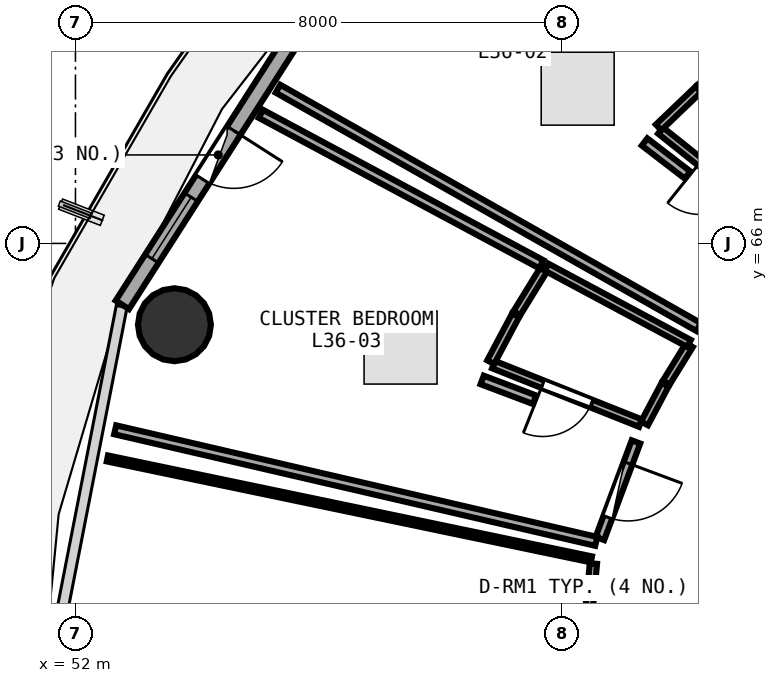
"""IFC4 building model, lengths in metres.
Left out: names, types, materials, properties, quantities, classifications, styles, units other than length and angle.
Written with IfcOpenShell. Run it as: python <this file> out.ifc"""

import sys

from ifc_helpers import new_model, si_unit, direction, frame, frame_2d, origin, origin_2d, place, context, subcontext, project, spatial, rectangle, circle, extrude, element, fill, save


model = new_model("IFC4")
c1 = context("Model", 3, precision=1e-05, world=origin(), true_north=direction((0.0, 1.0)))
c2 = subcontext(c1, "Body", "Model", "MODEL_VIEW")
j1 = project(units=[si_unit("LENGTHUNIT", "METRE"), si_unit("PLANEANGLEUNIT", "RADIAN")], contexts=[c1])
p1 = place(None, origin())
s1 = spatial("IfcSite", under=j1, at=p1, CompositionType="ELEMENT")
p2 = place(p1, origin())
s2 = spatial("IfcBuilding", under=s1, at=p2, CompositionType="ELEMENT")
p3 = place(p2, frame((0.0, 0.0, 143.1)))
s3 = spatial("IfcBuildingStorey", under=s2, at=p3, CompositionType="ELEMENT", Elevation=143.1)
p4 = place(p3, frame((53.627, 64.663, 0.0), z_axis=(0.0, 0.0, 1.0), x_axis=(1.0, 0.0, 0.0)))
e1 = element("IfcColumn", 1, at=p4, inside=s3, PredefinedType="COLUMN", context=c2, shape_type="SweptSolid", body=[
    extrude(circle(Radius=0.6, at=origin_2d()), origin(), (0.0, 0.0, 1.0), 3.75),
])
p5 = place(p3, frame((56.679, 71.1, 0.0), z_axis=(0.0, 0.0, 1.0), x_axis=(-0.538801521808, -0.842432739213, 0.0)))
e2 = element("IfcWall", 2, at=p5, inside=s3, PredefinedType="SOLIDWALL", context=c2, shape_type="SweptSolid", body=[
    extrude(rectangle(XDim=7.253, YDim=0.26, at=frame_2d((3.627, 0.0))), origin(), (0.0, 0.0, 1.0), 3.475),
])
p6 = place(p5, frame((3.852, 0.0, 0.0)))
e3 = element("IfcOpeningElement", 3, at=p6, cuts=e2, PredefinedType="OPENING", context=c2, shape_type="SweptSolid", body=[
    extrude(rectangle(XDim=0.95, YDim=2.1, at=frame_2d((0.475, 1.05))), frame((0.0, 0.14, 0.0), z_axis=(0.0, -1.0, 0.0), x_axis=(1.0, 0.0, 0.0)), (0.0, 0.0, 1.0), 0.28),
])
p7 = place(p5, frame((5.152, 0.0, 0.85)))
e4 = element("IfcOpeningElement", 4, at=p7, cuts=e2, PredefinedType="OPENING", context=c2, shape_type="SweptSolid", body=[
    extrude(rectangle(XDim=1.2, YDim=1.45, at=frame_2d((0.6, 0.725))), frame((0.0, 0.14, 0.0), z_axis=(0.0, -1.0, 0.0), x_axis=(1.0, 0.0, 0.0)), (0.0, 0.0, 1.0), 0.28),
])
p8 = place(p3, frame((63.599, 66.278, 0.0), z_axis=(0.0, 0.0, 1.0), x_axis=(-0.781386491078, 0.624047395284, 0.0)))
e5 = element("IfcWall", 5, at=p8, inside=s3, PredefinedType="PLUMBINGWALL", context=c2, shape_type="SweptSolid", body=[
    extrude(rectangle(XDim=2.529, YDim=0.13, at=frame_2d((1.265, 0.0))), origin(), (0.0, 0.0, 1.0), 2.975),
])
p9 = place(p8, frame((0.835, 0.0, 0.0)))
e6 = element("IfcOpeningElement", 6, at=p9, cuts=e5, PredefinedType="OPENING", context=c2, shape_type="SweptSolid", body=[
    extrude(rectangle(XDim=0.86, YDim=2.05, at=frame_2d((0.43, 1.025))), frame((0.0, 0.075, 0.0), z_axis=(0.0, -1.0, 0.0), x_axis=(1.0, 0.0, 0.0)), (0.0, 0.0, 1.0), 0.15),
])
p10 = place(p3, frame((61.293, 63.044, 0.0), z_axis=(0.0, 0.0, 1.0), x_axis=(-0.929051463741, 0.369950507123, 0.0)))
e7 = element("IfcWall", 7, at=p10, inside=s3, PredefinedType="PLUMBINGWALL", context=c2, shape_type="SweptSolid", body=[
    extrude(rectangle(XDim=2.602, YDim=0.13, at=frame_2d((1.301, 0.0))), origin(), (0.0, 0.0, 1.0), 3.235),
])
p11 = place(p10, frame((0.871, 0.0, 0.0)))
e8 = element("IfcOpeningElement", 8, at=p11, cuts=e7, PredefinedType="OPENING", context=c2, shape_type="SweptSolid", body=[
    extrude(rectangle(XDim=0.86, YDim=2.05, at=frame_2d((0.43, 1.025))), frame((0.0, 0.075, 0.0), z_axis=(0.0, -1.0, 0.0), x_axis=(1.0, 0.0, 0.0)), (0.0, 0.0, 1.0), 0.15),
])
p12 = place(p3, frame((61.218, 62.736, 0.0), z_axis=(0.0, 0.0, 1.0), x_axis=(-0.349718783302, -0.93685472332, 0.0)))
e9 = element("IfcWall", 9, at=p12, inside=s3, PredefinedType="PARTITIONING", context=c2, shape_type="SweptSolid", body=[
    extrude(rectangle(XDim=1.696, YDim=0.15, at=frame_2d((0.848, 0.0))), origin(), (0.0, 0.0, 1.0), 3.235),
])
p13 = place(p12, frame((0.373, 0.0, 0.0)))
e10 = element("IfcOpeningElement", 10, at=p13, cuts=e9, PredefinedType="OPENING", context=c2, shape_type="SweptSolid", body=[
    extrude(rectangle(XDim=0.95, YDim=2.08, at=frame_2d((0.475, 1.04))), frame((0.0, 0.085, 0.0), z_axis=(0.0, -1.0, 0.0), x_axis=(1.0, 0.0, 0.0)), (0.0, 0.0, 1.0), 0.17),
])
p14 = place(p3, frame((60.518, 60.736, 0.0), z_axis=(0.0, 0.0, 1.0), x_axis=(-0.093855600535, -0.995585820634, 0.0)))
e11 = element("IfcWall", 11, at=p14, inside=s3, PredefinedType="PARTITIONING", context=c2, shape_type="SweptSolid", body=[
    extrude(rectangle(XDim=3.408, YDim=0.12, at=frame_2d((1.704, 0.0))), origin(), (0.0, 0.0, 1.0), 2.975),
])
p15 = place(p14, frame((1.254, 0.0, 0.0)))
e12 = element("IfcOpeningElement", 12, at=p15, cuts=e11, PredefinedType="OPENING", context=c2, shape_type="SweptSolid", body=[
    extrude(rectangle(XDim=0.9, YDim=2.08, at=frame_2d((0.45, 1.04))), frame((0.0, 0.07, 0.0), z_axis=(0.0, -1.0, 0.0), x_axis=(1.0, 0.0, 0.0)), (0.0, 0.0, 1.0), 0.14),
])
p16 = place(p3, frame((65.046, 67.523, 0.0), z_axis=(0.0, 0.0, 1.0), x_axis=(-0.683295427563, 0.730142012674, 0.0)))
e13 = element("IfcWall", 13, at=p16, inside=s3, PredefinedType="PARTITIONING", context=c2, shape_type="SweptSolid", body=[
    extrude(rectangle(XDim=7.713, YDim=0.15, at=frame_2d((3.856, 0.0))), origin(), (0.0, 0.0, 1.0), 3.025),
])
p17 = place(p3, frame((61.591, 67.908, 0.0), z_axis=(0.0, 0.0, 1.0), x_axis=(0.722606643047, 0.691259458831, 0.0)))
e14 = element("IfcWall", 14, at=p17, inside=s3, PredefinedType="PLUMBINGWALL", context=c2, shape_type="SweptSolid", body=[
    extrude(rectangle(XDim=0.903, YDim=0.13, at=frame_2d((0.452, 0.0))), origin(), (0.0, 0.0, 1.0), 2.975),
])
p18 = place(p3, frame((62.273, 68.559, 0.0), z_axis=(0.0, 0.0, 1.0), x_axis=(0.763243602663, 0.646110828724, 0.0)))
e15 = element("IfcWall", 15, at=p18, inside=s3, PredefinedType="PLUMBINGWALL", context=c2, shape_type="SweptSolid", body=[
    extrude(rectangle(XDim=0.909, YDim=0.13, at=frame_2d((0.454, 0.0))), origin(), (0.0, 0.0, 1.0), 3.48),
])
p19 = place(p3, frame((62.249, 64.625, 0.0), z_axis=(0.0, 0.0, 1.0), x_axis=(-0.870077493263, 0.492914957896, 0.0)))
e16 = element("IfcWall", 16, at=p19, inside=s3, PredefinedType="PARTITIONING", context=c2, shape_type="SweptSolid", body=[
    extrude(rectangle(XDim=7.952, YDim=0.15, at=frame_2d((3.976, 0.0))), origin(), (0.0, 0.0, 1.0), 2.975),
])
p20 = place(p3, frame((61.36, 67.669, 0.0), z_axis=(0.0, 0.0, 1.0), x_axis=(0.793020417561, -0.609195056884, 0.0)))
e17 = element("IfcWall", 17, at=p20, inside=s3, PredefinedType="PARTITIONING", context=c2, shape_type="SweptSolid", body=[
    extrude(rectangle(XDim=0.893, YDim=0.15, at=frame_2d((0.446, 0.0))), origin(), (0.0, 0.0, 1.0), 3.48),
])
p21 = place(p3, frame((62.097, 64.329, 0.0), z_axis=(0.0, 0.0, 1.0), x_axis=(-0.524547607878, -0.851381117402, 0.0)))
e18 = element("IfcWall", 18, at=p21, inside=s3, PredefinedType="PLUMBINGWALL", context=c2, shape_type="SweptSolid", body=[
    extrude(rectangle(XDim=0.726, YDim=0.13, at=frame_2d((0.363, 0.0))), origin(), (0.0, 0.0, 1.0), 3.48),
])
p22 = place(p3, frame((61.697, 63.676, 0.0), z_axis=(0.0, 0.0, 1.0), x_axis=(-0.469163481751, -0.88311133352, 0.0)))
e19 = element("IfcWall", 19, at=p22, inside=s3, PredefinedType="PLUMBINGWALL", context=c2, shape_type="SweptSolid", body=[
    extrude(rectangle(XDim=0.721, YDim=0.13, at=frame_2d((0.36, 0.0))), origin(), (0.0, 0.0, 1.0), 3.48),
])
p23 = place(p3, frame((58.829, 64.047, 0.0), z_axis=(0.0, 0.0, 1.0), x_axis=(0.469311809042, 0.883032516895, 0.0)))
e20 = element("IfcWall", 20, at=p23, inside=s3, PredefinedType="PLUMBINGWALL", context=c2, shape_type="SweptSolid", body=[
    extrude(rectangle(XDim=0.874, YDim=0.13, at=frame_2d((0.437, 0.0))), origin(), (0.0, 0.0, 1.0), 2.975),
])
p24 = place(p3, frame((59.26, 64.853, 0.0), z_axis=(0.0, 0.0, 1.0), x_axis=(0.524097425664, 0.851658316705, 0.0)))
e21 = element("IfcWall", 21, at=p24, inside=s3, PredefinedType="PLUMBINGWALL", context=c2, shape_type="SweptSolid", body=[
    extrude(rectangle(XDim=0.879, YDim=0.13, at=frame_2d((0.44, 0.0))), origin(), (0.0, 0.0, 1.0), 2.975),
])
p25 = place(p3, frame((59.749, 65.61, 0.0), z_axis=(0.0, 0.0, 1.0), x_axis=(0.881540078275, -0.472109193296, 0.0)))
e22 = element("IfcWall", 22, at=p25, inside=s3, PredefinedType="PLUMBINGWALL", context=c2, shape_type="SweptSolid", body=[
    extrude(rectangle(XDim=2.656, YDim=0.13, at=frame_2d((1.328, 0.0))), origin(), (0.0, 0.0, 1.0), 2.975),
])
p26 = place(p3, frame((60.565, 61.1, 0.0), z_axis=(0.0, 0.0, 1.0), x_axis=(-0.97414388338, 0.225928516292, 0.0)))
e23 = element("IfcWall", 23, at=p26, inside=s3, PredefinedType="PARTITIONING", context=c2, shape_type="SweptSolid", body=[
    extrude(rectangle(XDim=8.122, YDim=0.15, at=frame_2d((4.061, 0.0))), origin(), (0.0, 0.0, 1.0), 3.025),
])
p27 = place(p3, frame((55.049, 68.131, 0.0), z_axis=(0.0, 0.0, 1.0), x_axis=(0.881257916537, -0.472635678447, 0.0)))
e24 = element("IfcWall", 24, at=p27, inside=s3, PredefinedType="PARTITIONING", context=c2, shape_type="SweptSolid", body=[
    extrude(rectangle(XDim=5.233, YDim=0.15, at=frame_2d((2.616, 0.0))), origin(), (0.0, 0.0, 1.0), 3.025),
])
p28 = place(p3, frame((58.688, 63.755, 0.0), z_axis=(0.0, 0.0, 1.0), x_axis=(0.935532386314, -0.353240929336, 0.0)))
e25 = element("IfcWall", 25, at=p28, inside=s3, PredefinedType="PARTITIONING", context=c2, shape_type="SweptSolid", body=[
    extrude(rectangle(XDim=0.922, YDim=0.15, at=frame_2d((0.461, 0.0))), origin(), (0.0, 0.0, 1.0), 3.48),
])
p29 = place(p3, frame((52.525, 62.464, 0.0), z_axis=(0.0, 0.0, 1.0), x_axis=(0.978946183013, -0.204118521367, 0.0)))
e26 = element("IfcWall", 26, at=p29, inside=s3, PredefinedType="PARTITIONING", context=c2, shape_type="SweptSolid", body=[
    extrude(rectangle(XDim=8.131, YDim=0.1, at=frame_2d((4.065, 0.0))), origin(), (0.0, 0.0, 1.0), 3.025),
])
p30 = place(p6, frame((0.95, 0.0, 0.0), z_axis=(0.0, 0.0, 1.0), x_axis=(-1.0, 0.0, 0.0)))
e27 = element("IfcDoor", 27, at=p30, inside=s3, OperationType="SINGLE_SWING_RIGHT", PredefinedType="DOOR", context=c2, shape_type="SweptSolid", body=[
    extrude(rectangle(XDim=0.95, YDim=2.1, at=frame_2d((0.475, 1.05))), frame((0.0, 0.025, 0.0), z_axis=(0.0, -1.0, 0.0), x_axis=(1.0, 0.0, 0.0)), (0.0, 0.0, 1.0), 0.05),
])
fill(e3, e27)
p31 = place(p7, origin())
e28 = element("IfcWindow", 28, at=p31, inside=s3, PartitioningType="SINGLE_PANEL", PredefinedType="WINDOW", context=c2, shape_type="SweptSolid", body=[
    extrude(rectangle(XDim=1.2, YDim=1.45, at=frame_2d((0.6, 0.725))), frame((0.0, 0.03, 0.0), z_axis=(0.0, -1.0, 0.0), x_axis=(1.0, 0.0, 0.0)), (0.0, 0.0, 1.0), 0.06),
])
fill(e4, e28)
p32 = place(p11, origin())
e29 = element("IfcDoor", 29, at=p32, inside=s3, OperationType="SINGLE_SWING_RIGHT", PredefinedType="DOOR", context=c2, shape_type="SweptSolid", body=[
    extrude(rectangle(XDim=0.86, YDim=2.05, at=frame_2d((0.43, 1.025))), frame((0.0, 0.025, 0.0), z_axis=(0.0, -1.0, 0.0), x_axis=(1.0, 0.0, 0.0)), (0.0, 0.0, 1.0), 0.05),
])
fill(e8, e29)
p33 = place(p13, origin())
e30 = element("IfcDoor", 30, at=p33, inside=s3, OperationType="SINGLE_SWING_LEFT", PredefinedType="DOOR", context=c2, shape_type="SweptSolid", body=[
    extrude(rectangle(XDim=0.95, YDim=2.08, at=frame_2d((0.475, 1.04))), frame((0.0, 0.025, 0.0), z_axis=(0.0, -1.0, 0.0), x_axis=(1.0, 0.0, 0.0)), (0.0, 0.0, 1.0), 0.05),
])
fill(e10, e30)
save(model, sys.argv[1])
